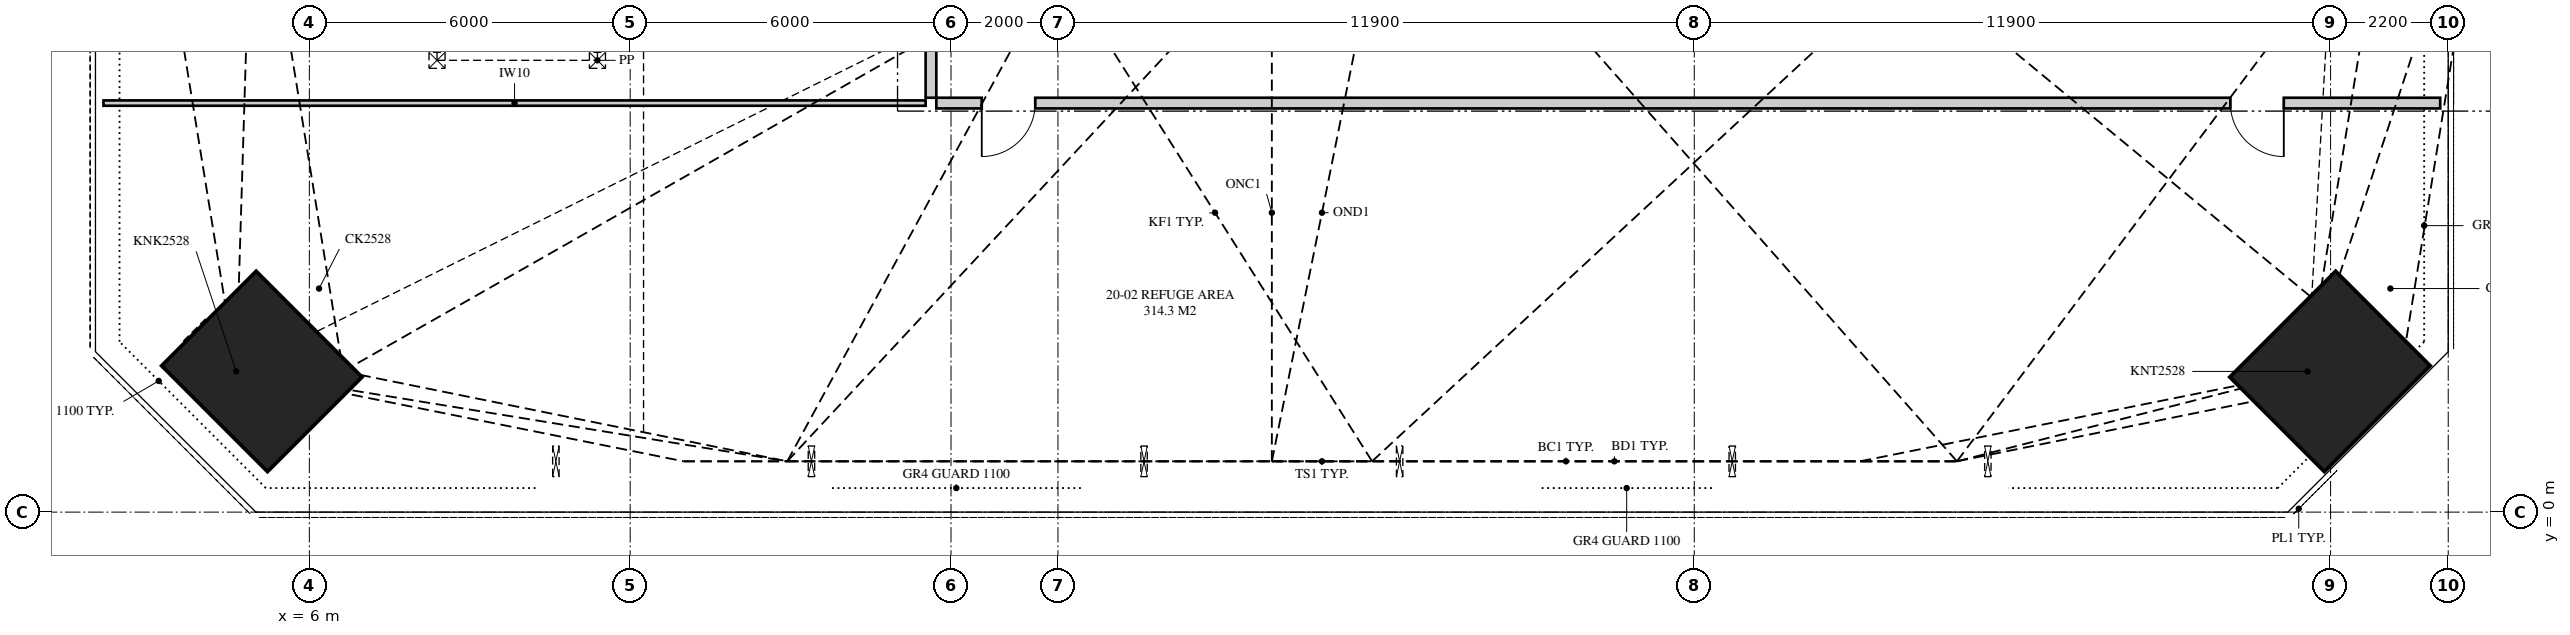
"""IFC4 building model, lengths in metres.
Left out: names, types, materials, properties, quantities, classifications, styles, units other than length and angle.
Written with IfcOpenShell. Run it as: python <this file> out.ifc"""

import sys

from ifc_helpers import new_model, si_unit, direction, frame, frame_2d, origin, origin_2d, place, context, subcontext, project, spatial, polyline, rectangle, hollow_rectangle, outline, extrude, element, fill, save


model = new_model("IFC4")
c1 = context("Model", 3, precision=1e-05, world=origin(), true_north=direction((0.0, 1.0)))
c2 = subcontext(c1, "Body", "Model", "MODEL_VIEW")
j1 = project(units=[si_unit("LENGTHUNIT", "METRE"), si_unit("PLANEANGLEUNIT", "RADIAN")], contexts=[c1])
p1 = place(None, origin())
s1 = spatial("IfcSite", under=j1, at=p1, CompositionType="ELEMENT")
p2 = place(p1, origin())
s2 = spatial("IfcBuilding", under=s1, at=p2, CompositionType="ELEMENT")
p3 = place(p2, frame((0.0, 0.0, 74.75)))
s3 = spatial("IfcBuildingStorey", under=s2, at=p3, CompositionType="ELEMENT", Elevation=74.75)
p4 = place(p3, frame((4.91, 2.631, 0.697), z_axis=(0.371390676354, 0.0, 0.928476690885), x_axis=(0.631748504238, 0.732827974204, -0.252699401695)))
e1 = element("IfcColumn", 1, at=p4, inside=s3, PredefinedType="COLUMN", context=c2, shape_type="SweptSolid", body=[
    extrude(hollow_rectangle(XDim=2.5, YDim=2.8, WallThickness=0.175, at=origin_2d()), origin(), (0.0, 0.0, 1.0), 4.635),
])
p5 = place(p3, frame((43.585, 2.631, 0.62), z_axis=(0.330350424728, 0.0, 0.943858356366), x_axis=(-0.647863070943, 0.727225506888, 0.22675207483)))
e2 = element("IfcColumn", 2, at=p5, inside=s3, PredefinedType="COLUMN", context=c2, shape_type="SweptSolid", body=[
    extrude(hollow_rectangle(XDim=2.5, YDim=2.8, WallThickness=0.25, at=origin_2d()), origin(), (0.0, 0.0, 1.0), 4.641),
])
p6 = place(p3, frame((17.725, 7.65, 0.0), z_axis=(0.0, 0.0, 1.0), x_axis=(1.0, 0.0, 0.0)))
e3 = element("IfcWall", 3, at=p6, inside=s3, PredefinedType="PARTITIONING", context=c2, shape_type="SweptSolid", body=[
    extrude(outline(polyline([(26.434, 0.0), (28.125, 0.0), (28.125, 0.665), (26.524, 0.665), (26.524, 2.205), (26.594, 2.302), (28.085, 2.504), (28.125, 2.504), (28.125, 3.32), (27.482, 3.32), (27.482, 4.72), (24.492, 4.72), (24.492, 4.141), (23.751, 4.141), (23.751, 4.72), (21.813, 4.72), (21.813, 4.141), (20.829, 4.141), (20.829, 4.72), (15.827, 4.72), (15.827, 4.141), (14.917, 4.141), (14.917, 4.72), (13.574, 4.72), (13.574, 4.141), (12.768, 4.141), (12.768, 4.72), (8.439, 4.72), (8.439, 4.194), (7.861, 4.194), (7.861, 4.72), (4.26, 4.72), (4.26, 4.141), (3.037, 4.141), (3.037, 4.72), (1.183, 4.72), (1.183, 4.141), (0.536, 4.141), (0.536, 4.72), (0.0, 4.72), (0.0, 0.0), (25.421, 0.0), (25.421, 1.5), (26.434, 1.5), (26.434, 0.0)]), holes=[polyline([(7.305, 3.208), (7.349, 3.323), (7.946, 3.385), (7.946, 2.858), (7.903, 2.743), (7.305, 2.68), (7.305, 3.208)])]), frame((0.0, 0.1, 0.0), z_axis=(0.0, -1.0, 0.0), x_axis=(1.0, 0.0, 0.0)), (0.0, 0.0, 1.0), 0.2),
])
p7 = place(p6, frame((0.85, 0.0, 0.0)))
e4 = element("IfcOpeningElement", 4, at=p7, cuts=e3, PredefinedType="OPENING", context=c2, shape_type="SweptSolid", body=[
    extrude(rectangle(XDim=1.0, YDim=2.1, at=frame_2d((0.5, 1.05))), frame((0.0, 0.11, 0.0), z_axis=(0.0, -1.0, 0.0), x_axis=(1.0, 0.0, 0.0)), (0.0, 0.0, 1.0), 0.22),
])
p8 = place(p6, frame((24.2, 0.0, 0.0)))
e5 = element("IfcOpeningElement", 5, at=p8, cuts=e3, PredefinedType="OPENING", context=c2, shape_type="SweptSolid", body=[
    extrude(rectangle(XDim=1.0, YDim=2.1, at=frame_2d((0.5, 1.05))), frame((0.0, 0.11, 0.0), z_axis=(0.0, -1.0, 0.0), x_axis=(1.0, 0.0, 0.0)), (0.0, 0.0, 1.0), 0.22),
])
p9 = place(p3, frame((17.625, 7.75, 0.0), z_axis=(0.0, 0.0, 1.0), x_axis=(0.0, 1.0, 0.0)))
e6 = element("IfcWall", 6, at=p9, inside=s3, PredefinedType="PARTITIONING", context=c2, shape_type="SweptSolid", body=[
    extrude(outline(polyline([(1.55, 1.5), (1.55, 4.72), (1.475, 4.72), (1.475, 4.141), (0.818, 4.141), (0.818, 4.72), (0.0, 4.72), (0.0, 0.0), (0.715, 0.0), (0.715, 1.5), (1.55, 1.5)])), frame((0.0, 0.1, 0.0), z_axis=(0.0, -1.0, 0.0), x_axis=(1.0, 0.0, 0.0)), (0.0, 0.0, 1.0), 0.2),
])
p10 = place(p3, frame((2.15, 7.65, 0.0), z_axis=(0.0, 0.0, 1.0), x_axis=(1.0, 0.0, 0.0)))
e7 = element("IfcWall", 7, at=p10, inside=s3, PredefinedType="PARTITIONING", context=c2, shape_type="SweptSolid", body=[
    extrude(outline(polyline([(2.95, 4.72), (0.0, 4.72), (0.0, 0.0), (11.378, 0.0), (11.378, 1.5), (13.832, 1.5), (13.832, 0.0), (15.375, 0.0), (15.375, 4.72), (13.853, 4.72), (13.853, 4.141), (12.723, 4.141), (12.723, 4.72), (11.36, 4.72), (11.36, 4.12), (8.84, 4.12), (8.84, 4.72), (4.385, 4.72), (4.385, 3.32), (2.95, 3.32), (2.95, 4.72)]), holes=[polyline([(1.924, 0.773), (1.924, 2.321), (1.927, 2.376), (3.347, 2.396), (3.347, 0.848), (3.344, 0.793), (1.924, 0.773)])]), frame((0.0, 0.05, 0.0), z_axis=(0.0, -1.0, 0.0), x_axis=(1.0, 0.0, 0.0)), (0.0, 0.0, 1.0), 0.1),
])
p11 = place(p7, frame((1.0, 0.0, 0.0), z_axis=(0.0, 0.0, 1.0), x_axis=(-1.0, 0.0, 0.0)))
e8 = element("IfcDoor", 8, at=p11, inside=s3, OperationType="SINGLE_SWING_RIGHT", PredefinedType="DOOR", context=c2, shape_type="SweptSolid", body=[
    extrude(rectangle(XDim=1.0, YDim=2.1, at=frame_2d((0.5, 1.05))), frame((0.0, 0.025, 0.0), z_axis=(0.0, -1.0, 0.0), x_axis=(1.0, 0.0, 0.0)), (0.0, 0.0, 1.0), 0.05),
])
fill(e4, e8)
p12 = place(p8, frame((1.0, 0.0, 0.0), z_axis=(0.0, 0.0, 1.0), x_axis=(-1.0, 0.0, 0.0)))
e9 = element("IfcDoor", 9, at=p12, inside=s3, OperationType="SINGLE_SWING_LEFT", PredefinedType="DOOR", context=c2, shape_type="SweptSolid", body=[
    extrude(rectangle(XDim=1.0, YDim=2.1, at=frame_2d((0.5, 1.05))), frame((0.0, 0.025, 0.0), z_axis=(0.0, -1.0, 0.0), x_axis=(1.0, 0.0, 0.0)), (0.0, 0.0, 1.0), 0.05),
])
fill(e5, e9)
save(model, sys.argv[1])
